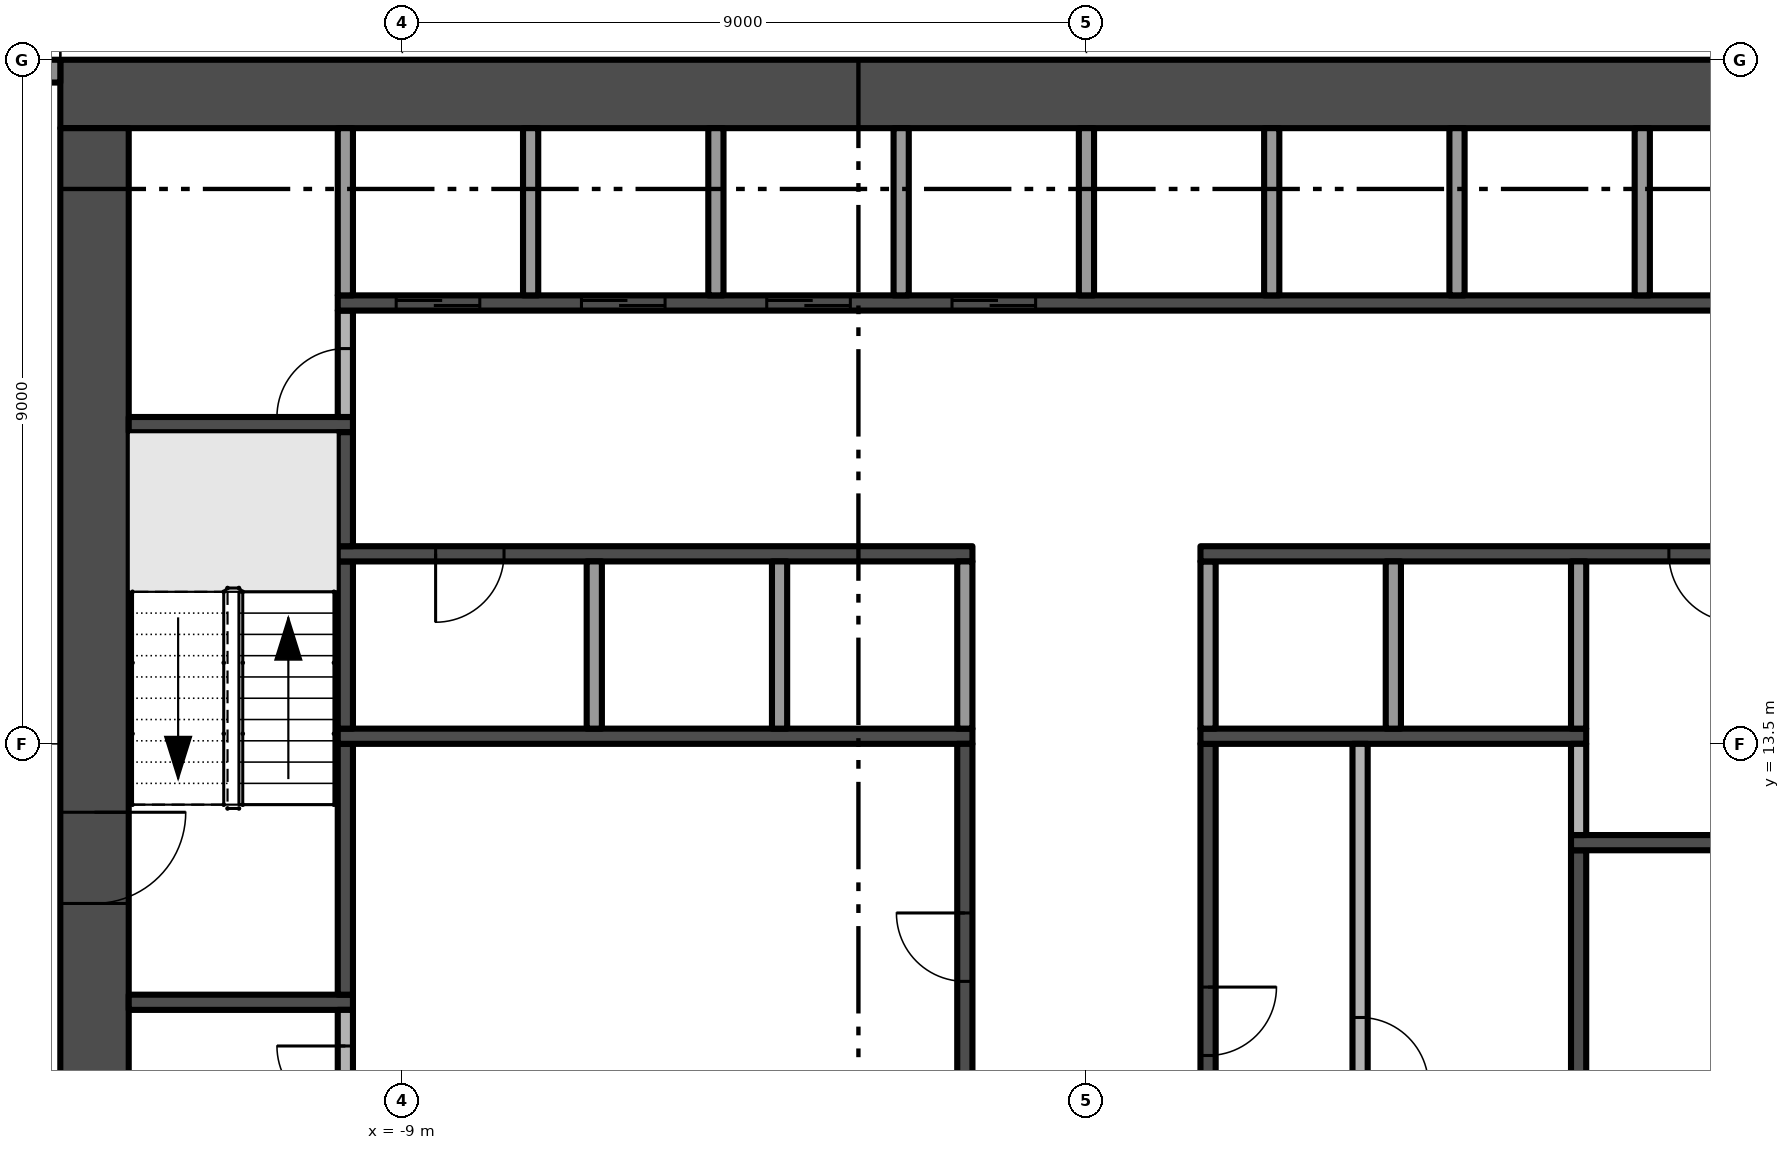
"""IFC4 building model, lengths in metres.
Left out: names, types, materials, properties, quantities, classifications, styles, units other than length and angle.
Written with IfcOpenShell. Run it as: python <this file> out.ifc"""

import sys

from ifc_helpers import new_model, si_unit, direction, frame, frame_2d, origin, place, context, subcontext, project, spatial, rectangle, extrude, element, fill, save


model = new_model("IFC4")
c1 = context("Model", 3, precision=1e-05, world=origin(), true_north=direction((0.0, 1.0)))
c2 = subcontext(c1, "Body", "Model", "MODEL_VIEW")
j1 = project(units=[si_unit("LENGTHUNIT", "METRE"), si_unit("PLANEANGLEUNIT", "RADIAN")], contexts=[c1])
p1 = place(None, origin())
s1 = spatial("IfcSite", under=j1, at=p1, CompositionType="ELEMENT")
p2 = place(p1, origin())
s2 = spatial("IfcBuilding", under=s1, at=p2, CompositionType="ELEMENT")
p3 = place(p2, frame((0.0, 0.0, 30.2)))
s3 = spatial("IfcBuildingStorey", under=s2, at=p3, CompositionType="ELEMENT", Elevation=30.2)
p4 = place(p3, frame((13.5, 22.05, -0.3), z_axis=(0.0, 0.0, 1.0), x_axis=(-1.0, 0.0, 0.0)))
e1 = element("IfcWall", 1, at=p4, inside=s3, PredefinedType="SHEAR", context=c2, shape_type="SweptSolid", body=[
    extrude(rectangle(XDim=27.0, YDim=0.9, at=frame_2d((13.5, 0.0))), origin(), (0.0, 0.0, 1.0), 3.8),
])
p5 = place(p3, frame((-13.05, 21.6, -0.3), z_axis=(0.0, 0.0, 1.0), x_axis=(0.0, -1.0, 0.0)))
e2 = element("IfcWall", 2, at=p5, inside=s3, PredefinedType="SHEAR", context=c2, shape_type="SweptSolid", body=[
    extrude(rectangle(XDim=16.2, YDim=0.9, at=frame_2d((8.1, 0.0))), origin(), (0.0, 0.0, 1.0), 3.8),
])
p6 = place(p5, frame((9.0, 0.0, 0.3)))
e3 = element("IfcOpeningElement", 3, at=p6, cuts=e2, PredefinedType="OPENING", context=c2, shape_type="SweptSolid", body=[
    extrude(rectangle(XDim=1.2, YDim=2.2, at=frame_2d((0.6, 1.1))), frame((0.0, 0.46, 0.0), z_axis=(0.0, -1.0, 0.0), x_axis=(1.0, 0.0, 0.0)), (0.0, 0.0, 1.0), 0.92),
])
p7 = place(p3, frame((-17.275, 22.35, 0.0), z_axis=(0.0, 0.0, 1.0), x_axis=(1.0, 0.0, 0.0)))
e4 = element("IfcWall", 4, at=p7, inside=s3, PredefinedType="SOLIDWALL", context=c2, shape_type="SweptSolid", body=[
    extrude(rectangle(XDim=3.775, YDim=0.3, at=frame_2d((1.887, 0.0))), origin(), (0.0, 0.0, 1.0), 3.5),
])
p8 = place(p7, frame((0.325, 0.0, 0.45)))
e5 = element("IfcOpeningElement", 5, at=p8, cuts=e4, PredefinedType="OPENING", context=c2, shape_type="SweptSolid", body=[
    extrude(rectangle(XDim=2.6, YDim=2.65, at=frame_2d((1.3, 1.325))), frame((0.0, 0.16, 0.0), z_axis=(0.0, -1.0, 0.0), x_axis=(1.0, 0.0, 0.0)), (0.0, 0.0, 1.0), 0.32),
])
for number, where, z_axis, x_axis in (
    (6, (-12.6, 10.1, 0.0), (0.0, 0.0, 1.0), (1.0, 0.0, 0.0)),
    (7, (-12.6, 17.7, 0.0), (0.0, 0.0, 1.0), (1.0, 0.0, 0.0)),
):
    element("IfcWall", number, at=place(p3, frame(where, z_axis=z_axis, x_axis=x_axis)), inside=s3, PredefinedType="SHEAR", context=c2, shape_type="SweptSolid", body=[
        extrude(rectangle(XDim=2.95, YDim=0.2, at=frame_2d((1.475, 0.0))), origin(), (0.0, 0.0, 1.0), 3.5),
    ])
p9 = place(p3, frame((-9.75, 8.15, 0.0), z_axis=(0.0, 0.0, 1.0), x_axis=(0.0, 1.0, 0.0)))
e8 = element("IfcWall", 8, at=p9, inside=s3, PredefinedType="PARTITIONING", context=c2, shape_type="SweptSolid", body=[
    extrude(rectangle(XDim=1.85, YDim=0.2, at=frame_2d((0.925, 0.0))), origin(), (0.0, 0.0, 1.0), 3.5),
])
p10 = place(p9, frame((0.475, 0.0, 0.0)))
e9 = element("IfcOpeningElement", 9, at=p10, cuts=e8, PredefinedType="OPENING", context=c2, shape_type="SweptSolid", body=[
    extrude(rectangle(XDim=0.9, YDim=2.1, at=frame_2d((0.45, 1.05))), frame((0.0, 0.11, 0.0), z_axis=(0.0, -1.0, 0.0), x_axis=(1.0, 0.0, 0.0)), (0.0, 0.0, 1.0), 0.22),
])
p11 = place(p3, frame((-9.75, 10.2, 0.0), z_axis=(0.0, 0.0, 1.0), x_axis=(0.0, 1.0, 0.0)))
e10 = element("IfcWall", 10, at=p11, inside=s3, PredefinedType="SHEAR", context=c2, shape_type="SweptSolid", body=[
    extrude(rectangle(XDim=3.3, YDim=0.2, at=frame_2d((1.65, 0.0))), origin(), (0.0, 0.0, 1.0), 3.5),
])
p12 = place(p3, frame((-9.85, 13.6, 0.0), z_axis=(0.0, 0.0, 1.0), x_axis=(1.0, 0.0, 0.0)))
e11 = element("IfcWall", 11, at=p12, inside=s3, PredefinedType="SHEAR", context=c2, shape_type="SweptSolid", body=[
    extrude(rectangle(XDim=8.35, YDim=0.2, at=frame_2d((4.175, 0.0))), origin(), (0.0, 0.0, 1.0), 3.5),
])
p13 = place(p3, frame((-9.75, 13.7, 0.0), z_axis=(0.0, 0.0, 1.0), x_axis=(0.0, 1.0, 0.0)))
e12 = element("IfcWall", 12, at=p13, inside=s3, PredefinedType="SHEAR", context=c2, shape_type="SweptSolid", body=[
    extrude(rectangle(XDim=2.2, YDim=0.2, at=frame_2d((1.1, 0.0))), origin(), (0.0, 0.0, 1.0), 3.5),
])
p14 = place(p3, frame((-1.5, 16.0, 0.0), z_axis=(0.0, 0.0, 1.0), x_axis=(-1.0, 0.0, 0.0)))
e13 = element("IfcWall", 13, at=p14, inside=s3, PredefinedType="SHEAR", context=c2, shape_type="SweptSolid", body=[
    extrude(rectangle(XDim=8.35, YDim=0.2, at=frame_2d((4.175, 0.0))), origin(), (0.0, 0.0, 1.0), 3.5),
])
p15 = place(p14, frame((6.162, 0.0, 0.0)))
e14 = element("IfcOpeningElement", 14, at=p15, cuts=e13, PredefinedType="OPENING", context=c2, shape_type="SweptSolid", body=[
    extrude(rectangle(XDim=0.9, YDim=2.1, at=frame_2d((0.45, 1.05))), frame((0.0, 0.11, 0.0), z_axis=(0.0, -1.0, 0.0), x_axis=(1.0, 0.0, 0.0)), (0.0, 0.0, 1.0), 0.22),
])
p16 = place(p3, frame((-9.75, 16.1, 0.0), z_axis=(0.0, 0.0, 1.0), x_axis=(0.0, 1.0, 0.0)))
e15 = element("IfcWall", 15, at=p16, inside=s3, PredefinedType="SHEAR", context=c2, shape_type="SweptSolid", body=[
    extrude(rectangle(XDim=1.5, YDim=0.2, at=frame_2d((0.75, 0.0))), origin(), (0.0, 0.0, 1.0), 3.5),
])
p17 = place(p3, frame((-9.75, 17.8, 0.0), z_axis=(0.0, 0.0, 1.0), x_axis=(0.0, 1.0, 0.0)))
e16 = element("IfcWall", 16, at=p17, inside=s3, PredefinedType="PARTITIONING", context=c2, shape_type="SweptSolid", body=[
    extrude(rectangle(XDim=1.4, YDim=0.2, at=frame_2d((0.7, 0.0))), origin(), (0.0, 0.0, 1.0), 3.5),
])
p18 = place(p17, origin())
e17 = element("IfcOpeningElement", 17, at=p18, cuts=e16, PredefinedType="OPENING", context=c2, shape_type="SweptSolid", body=[
    extrude(rectangle(XDim=0.9, YDim=2.1, at=frame_2d((0.45, 1.05))), frame((0.0, 0.11, 0.0), z_axis=(0.0, -1.0, 0.0), x_axis=(1.0, 0.0, 0.0)), (0.0, 0.0, 1.0), 0.22),
])
p19 = place(p3, frame((-9.85, 19.3, 0.0), z_axis=(0.0, 0.0, 1.0), x_axis=(1.0, 0.0, 0.0)))
e18 = element("IfcWall", 18, at=p19, inside=s3, PredefinedType="SHEAR", context=c2, shape_type="SweptSolid", body=[
    extrude(rectangle(XDim=19.7, YDim=0.2, at=frame_2d((9.85, 0.0))), origin(), (0.0, 0.0, 1.0), 3.5),
])
p20 = place(p19, frame((0.769, 0.0, 0.0)))
e19 = element("IfcOpeningElement", 19, at=p20, cuts=e18, PredefinedType="OPENING", context=c2, shape_type="SweptSolid", body=[
    extrude(rectangle(XDim=1.1, YDim=2.1, at=frame_2d((0.55, 1.05))), frame((0.0, 0.11, 0.0), z_axis=(0.0, -1.0, 0.0), x_axis=(1.0, 0.0, 0.0)), (0.0, 0.0, 1.0), 0.22),
])
p21 = place(p19, frame((3.206, 0.0, 0.0)))
e20 = element("IfcOpeningElement", 20, at=p21, cuts=e18, PredefinedType="OPENING", context=c2, shape_type="SweptSolid", body=[
    extrude(rectangle(XDim=1.1, YDim=2.1, at=frame_2d((0.55, 1.05))), frame((0.0, 0.11, 0.0), z_axis=(0.0, -1.0, 0.0), x_axis=(1.0, 0.0, 0.0)), (0.0, 0.0, 1.0), 0.22),
])
p22 = place(p19, frame((5.644, 0.0, 0.0)))
e21 = element("IfcOpeningElement", 21, at=p22, cuts=e18, PredefinedType="OPENING", context=c2, shape_type="SweptSolid", body=[
    extrude(rectangle(XDim=1.1, YDim=2.1, at=frame_2d((0.55, 1.05))), frame((0.0, 0.11, 0.0), z_axis=(0.0, -1.0, 0.0), x_axis=(1.0, 0.0, 0.0)), (0.0, 0.0, 1.0), 0.22),
])
p23 = place(p19, frame((8.081, 0.0, 0.0)))
e22 = element("IfcOpeningElement", 22, at=p23, cuts=e18, PredefinedType="OPENING", context=c2, shape_type="SweptSolid", body=[
    extrude(rectangle(XDim=1.1, YDim=2.1, at=frame_2d((0.55, 1.05))), frame((0.0, 0.11, 0.0), z_axis=(0.0, -1.0, 0.0), x_axis=(1.0, 0.0, 0.0)), (0.0, 0.0, 1.0), 0.22),
])
for number, where, z_axis, x_axis in (
    (23, (-9.75, 19.4, 0.0), (0.0, 0.0, 1.0), (0.0, 1.0, 0.0)),
    (24, (-7.312, 19.4, 0.0), (0.0, 0.0, 1.0), (0.0, 1.0, 0.0)),
    (25, (-6.475, 13.7, 0.0), (0.0, 0.0, 1.0), (0.0, 1.0, 0.0)),
    (26, (-4.875, 19.4, 0.0), (0.0, 0.0, 1.0), (0.0, 1.0, 0.0)),
    (27, (-4.037, 13.7, 0.0), (0.0, 0.0, 1.0), (0.0, 1.0, 0.0)),
    (28, (-2.438, 19.4, 0.0), (0.0, 0.0, 1.0), (0.0, 1.0, 0.0)),
):
    element("IfcWall", number, at=place(p3, frame(where, z_axis=z_axis, x_axis=x_axis)), inside=s3, PredefinedType="PARTITIONING", context=c2, shape_type="SweptSolid", body=[
        extrude(rectangle(XDim=2.2, YDim=0.2, at=frame_2d((1.1, 0.0))), origin(), (0.0, 0.0, 1.0), 3.5),
    ])
p24 = place(p3, frame((-1.6, 8.15, 0.0), z_axis=(0.0, 0.0, 1.0), x_axis=(0.0, 1.0, 0.0)))
e29 = element("IfcWall", 29, at=p24, inside=s3, PredefinedType="SHEAR", context=c2, shape_type="SweptSolid", body=[
    extrude(rectangle(XDim=5.35, YDim=0.2, at=frame_2d((2.675, 0.0))), origin(), (0.0, 0.0, 1.0), 3.5),
])
p25 = place(p24, frame((2.225, 0.0, 0.0)))
e30 = element("IfcOpeningElement", 30, at=p25, cuts=e29, PredefinedType="OPENING", context=c2, shape_type="SweptSolid", body=[
    extrude(rectangle(XDim=0.9, YDim=2.1, at=frame_2d((0.45, 1.05))), frame((0.0, 0.11, 0.0), z_axis=(0.0, -1.0, 0.0), x_axis=(1.0, 0.0, 0.0)), (0.0, 0.0, 1.0), 0.22),
])
for number, where, z_axis, x_axis in (
    (31, (-1.6, 13.7, 0.0), (0.0, 0.0, 1.0), (0.0, 1.0, 0.0)),
    (32, (0.0, 19.4, 0.0), (0.0, 0.0, 1.0), (0.0, 1.0, 0.0)),
):
    element("IfcWall", number, at=place(p3, frame(where, z_axis=z_axis, x_axis=x_axis)), inside=s3, PredefinedType="PARTITIONING", context=c2, shape_type="SweptSolid", body=[
        extrude(rectangle(XDim=2.2, YDim=0.2, at=frame_2d((1.1, 0.0))), origin(), (0.0, 0.0, 1.0), 3.5),
    ])
p26 = place(p3, frame((1.6, 13.5, 0.0), z_axis=(0.0, 0.0, 1.0), x_axis=(0.0, -1.0, 0.0)))
e33 = element("IfcWall", 33, at=p26, inside=s3, PredefinedType="SHEAR", context=c2, shape_type="SweptSolid", body=[
    extrude(rectangle(XDim=8.1, YDim=0.2, at=frame_2d((4.05, 0.0))), origin(), (0.0, 0.0, 1.0), 3.5),
])
p27 = place(p26, frame((3.2, 0.0, 0.0)))
e34 = element("IfcOpeningElement", 34, at=p27, cuts=e33, PredefinedType="OPENING", context=c2, shape_type="SweptSolid", body=[
    extrude(rectangle(XDim=0.9, YDim=2.1, at=frame_2d((0.45, 1.05))), frame((0.0, 0.11, 0.0), z_axis=(0.0, -1.0, 0.0), x_axis=(1.0, 0.0, 0.0)), (0.0, 0.0, 1.0), 0.22),
])
p28 = place(p3, frame((1.5, 13.6, 0.0), z_axis=(0.0, 0.0, 1.0), x_axis=(1.0, 0.0, 0.0)))
e35 = element("IfcWall", 35, at=p28, inside=s3, PredefinedType="SHEAR", context=c2, shape_type="SweptSolid", body=[
    extrude(rectangle(XDim=5.075, YDim=0.2, at=frame_2d((2.538, 0.0))), origin(), (0.0, 0.0, 1.0), 3.5),
])
p29 = place(p3, frame((1.6, 13.7, 0.0), z_axis=(0.0, 0.0, 1.0), x_axis=(0.0, 1.0, 0.0)))
e36 = element("IfcWall", 36, at=p29, inside=s3, PredefinedType="PARTITIONING", context=c2, shape_type="SweptSolid", body=[
    extrude(rectangle(XDim=2.2, YDim=0.2, at=frame_2d((1.1, 0.0))), origin(), (0.0, 0.0, 1.0), 3.5),
])
p30 = place(p3, frame((9.85, 16.0, 0.0), z_axis=(0.0, 0.0, 1.0), x_axis=(-1.0, 0.0, 0.0)))
e37 = element("IfcWall", 37, at=p30, inside=s3, PredefinedType="SHEAR", context=c2, shape_type="SweptSolid", body=[
    extrude(rectangle(XDim=8.35, YDim=0.2, at=frame_2d((4.175, 0.0))), origin(), (0.0, 0.0, 1.0), 3.5),
])
p31 = place(p30, frame((1.288, 0.0, 0.0)))
e38 = element("IfcOpeningElement", 38, at=p31, cuts=e37, PredefinedType="OPENING", context=c2, shape_type="SweptSolid", body=[
    extrude(rectangle(XDim=0.9, YDim=2.1, at=frame_2d((0.45, 1.05))), frame((0.0, 0.11, 0.0), z_axis=(0.0, -1.0, 0.0), x_axis=(1.0, 0.0, 0.0)), (0.0, 0.0, 1.0), 0.22),
])
p32 = place(p3, frame((2.438, 19.4, 0.0), z_axis=(0.0, 0.0, 1.0), x_axis=(0.0, 1.0, 0.0)))
e39 = element("IfcWall", 39, at=p32, inside=s3, PredefinedType="PARTITIONING", context=c2, shape_type="SweptSolid", body=[
    extrude(rectangle(XDim=2.2, YDim=0.2, at=frame_2d((1.1, 0.0))), origin(), (0.0, 0.0, 1.0), 3.5),
])
p33 = place(p3, frame((3.6, 13.5, 0.0), z_axis=(0.0, 0.0, 1.0), x_axis=(0.0, -1.0, 0.0)))
e40 = element("IfcWall", 40, at=p33, inside=s3, PredefinedType="PARTITIONING", context=c2, shape_type="SweptSolid", body=[
    extrude(rectangle(XDim=8.1, YDim=0.2, at=frame_2d((4.05, 0.0))), origin(), (0.0, 0.0, 1.0), 3.5),
])
p34 = place(p33, frame((3.6, 0.0, 0.0)))
e41 = element("IfcOpeningElement", 41, at=p34, cuts=e40, PredefinedType="OPENING", context=c2, shape_type="SweptSolid", body=[
    extrude(rectangle(XDim=0.9, YDim=2.1, at=frame_2d((0.45, 1.05))), frame((0.0, 0.11, 0.0), z_axis=(0.0, -1.0, 0.0), x_axis=(1.0, 0.0, 0.0)), (0.0, 0.0, 1.0), 0.22),
])
for number, where, z_axis, x_axis in (
    (42, (4.037, 13.7, 0.0), (0.0, 0.0, 1.0), (0.0, 1.0, 0.0)),
    (43, (4.875, 19.4, 0.0), (0.0, 0.0, 1.0), (0.0, 1.0, 0.0)),
):
    element("IfcWall", number, at=place(p3, frame(where, z_axis=z_axis, x_axis=x_axis)), inside=s3, PredefinedType="PARTITIONING", context=c2, shape_type="SweptSolid", body=[
        extrude(rectangle(XDim=2.2, YDim=0.2, at=frame_2d((1.1, 0.0))), origin(), (0.0, 0.0, 1.0), 3.5),
    ])
p35 = place(p3, frame((6.475, 5.4, 0.0), z_axis=(0.0, 0.0, 1.0), x_axis=(0.0, 1.0, 0.0)))
e44 = element("IfcWall", 44, at=p35, inside=s3, PredefinedType="SHEAR", context=c2, shape_type="SweptSolid", body=[
    extrude(rectangle(XDim=6.7, YDim=0.2, at=frame_2d((3.35, 0.0))), origin(), (0.0, 0.0, 1.0), 3.5),
])
p36 = place(p3, frame((6.375, 12.2, 0.0), z_axis=(0.0, 0.0, 1.0), x_axis=(1.0, 0.0, 0.0)))
e45 = element("IfcWall", 45, at=p36, inside=s3, PredefinedType="SHEAR", context=c2, shape_type="SweptSolid", body=[
    extrude(rectangle(XDim=3.475, YDim=0.2, at=frame_2d((1.738, 0.0))), origin(), (0.0, 0.0, 1.0), 3.5),
])
p37 = place(p3, frame((6.475, 12.3, 0.0), z_axis=(0.0, 0.0, 1.0), x_axis=(0.0, 1.0, 0.0)))
e46 = element("IfcWall", 46, at=p37, inside=s3, PredefinedType="PARTITIONING", context=c2, shape_type="SweptSolid", body=[
    extrude(rectangle(XDim=1.2, YDim=0.2, at=frame_2d((0.6, 0.0))), origin(), (0.0, 0.0, 1.0), 3.5),
])
for number, where, z_axis, x_axis in (
    (47, (6.475, 13.7, 0.0), (0.0, 0.0, 1.0), (0.0, 1.0, 0.0)),
    (48, (7.312, 19.4, 0.0), (0.0, 0.0, 1.0), (0.0, 1.0, 0.0)),
):
    element("IfcWall", number, at=place(p3, frame(where, z_axis=z_axis, x_axis=x_axis)), inside=s3, PredefinedType="PARTITIONING", context=c2, shape_type="SweptSolid", body=[
        extrude(rectangle(XDim=2.2, YDim=0.2, at=frame_2d((1.1, 0.0))), origin(), (0.0, 0.0, 1.0), 3.5),
    ])
p38 = place(p6, frame((1.2, 0.0, 0.0), z_axis=(0.0, 0.0, 1.0), x_axis=(-1.0, 0.0, 0.0)))
e49 = element("IfcDoor", 49, at=p38, inside=s3, OperationType="SINGLE_SWING_RIGHT", PredefinedType="DOOR", context=c2, shape_type="SweptSolid", body=[
    extrude(rectangle(XDim=1.2, YDim=2.2, at=frame_2d((0.6, 1.1))), frame((0.0, 0.025, 0.0), z_axis=(0.0, -1.0, 0.0), x_axis=(1.0, 0.0, 0.0)), (0.0, 0.0, 1.0), 0.05),
])
fill(e3, e49)
p39 = place(p20, origin())
e50 = element("IfcDoor", 50, at=p39, inside=s3, OperationType="SLIDING_TO_LEFT", PredefinedType="DOOR", context=c2, shape_type="SweptSolid", body=[
    extrude(rectangle(XDim=1.1, YDim=2.1, at=frame_2d((0.55, 1.05))), frame((0.0, 0.025, 0.0), z_axis=(0.0, -1.0, 0.0), x_axis=(1.0, 0.0, 0.0)), (0.0, 0.0, 1.0), 0.05),
])
fill(e19, e50)
p40 = place(p21, origin())
e51 = element("IfcDoor", 51, at=p40, inside=s3, OperationType="SLIDING_TO_LEFT", PredefinedType="DOOR", context=c2, shape_type="SweptSolid", body=[
    extrude(rectangle(XDim=1.1, YDim=2.1, at=frame_2d((0.55, 1.05))), frame((0.0, 0.025, 0.0), z_axis=(0.0, -1.0, 0.0), x_axis=(1.0, 0.0, 0.0)), (0.0, 0.0, 1.0), 0.05),
])
fill(e20, e51)
p41 = place(p22, origin())
e52 = element("IfcDoor", 52, at=p41, inside=s3, OperationType="SLIDING_TO_LEFT", PredefinedType="DOOR", context=c2, shape_type="SweptSolid", body=[
    extrude(rectangle(XDim=1.1, YDim=2.1, at=frame_2d((0.55, 1.05))), frame((0.0, 0.025, 0.0), z_axis=(0.0, -1.0, 0.0), x_axis=(1.0, 0.0, 0.0)), (0.0, 0.0, 1.0), 0.05),
])
fill(e21, e52)
p42 = place(p23, origin())
e53 = element("IfcDoor", 53, at=p42, inside=s3, OperationType="SLIDING_TO_LEFT", PredefinedType="DOOR", context=c2, shape_type="SweptSolid", body=[
    extrude(rectangle(XDim=1.1, YDim=2.1, at=frame_2d((0.55, 1.05))), frame((0.0, 0.025, 0.0), z_axis=(0.0, -1.0, 0.0), x_axis=(1.0, 0.0, 0.0)), (0.0, 0.0, 1.0), 0.05),
])
fill(e22, e53)
p43 = place(p25, origin())
e54 = element("IfcDoor", 54, at=p43, inside=s3, OperationType="SINGLE_SWING_RIGHT", PredefinedType="DOOR", context=c2, shape_type="SweptSolid", body=[
    extrude(rectangle(XDim=0.9, YDim=2.1, at=frame_2d((0.45, 1.05))), frame((0.0, 0.025, 0.0), z_axis=(0.0, -1.0, 0.0), x_axis=(1.0, 0.0, 0.0)), (0.0, 0.0, 1.0), 0.05),
])
fill(e30, e54)
p44 = place(p15, origin())
e55 = element("IfcDoor", 55, at=p44, inside=s3, OperationType="SINGLE_SWING_RIGHT", PredefinedType="DOOR", context=c2, shape_type="SweptSolid", body=[
    extrude(rectangle(XDim=0.9, YDim=2.1, at=frame_2d((0.45, 1.05))), frame((0.0, 0.025, 0.0), z_axis=(0.0, -1.0, 0.0), x_axis=(1.0, 0.0, 0.0)), (0.0, 0.0, 1.0), 0.05),
])
fill(e14, e55)
p45 = place(p27, origin())
e56 = element("IfcDoor", 56, at=p45, inside=s3, OperationType="SINGLE_SWING_LEFT", PredefinedType="DOOR", context=c2, shape_type="SweptSolid", body=[
    extrude(rectangle(XDim=0.9, YDim=2.1, at=frame_2d((0.45, 1.05))), frame((0.0, 0.025, 0.0), z_axis=(0.0, -1.0, 0.0), x_axis=(1.0, 0.0, 0.0)), (0.0, 0.0, 1.0), 0.05),
])
fill(e34, e56)
p46 = place(p31, origin())
e57 = element("IfcDoor", 57, at=p46, inside=s3, OperationType="SINGLE_SWING_LEFT", PredefinedType="DOOR", context=c2, shape_type="SweptSolid", body=[
    extrude(rectangle(XDim=0.9, YDim=2.1, at=frame_2d((0.45, 1.05))), frame((0.0, 0.025, 0.0), z_axis=(0.0, -1.0, 0.0), x_axis=(1.0, 0.0, 0.0)), (0.0, 0.0, 1.0), 0.05),
])
fill(e38, e57)
p47 = place(p18, origin())
e58 = element("IfcDoor", 58, at=p47, inside=s3, OperationType="SINGLE_SWING_LEFT", PredefinedType="DOOR", context=c2, shape_type="SweptSolid", body=[
    extrude(rectangle(XDim=0.9, YDim=2.1, at=frame_2d((0.45, 1.05))), frame((0.0, 0.025, 0.0), z_axis=(0.0, -1.0, 0.0), x_axis=(1.0, 0.0, 0.0)), (0.0, 0.0, 1.0), 0.05),
])
fill(e17, e58)
p48 = place(p10, origin())
e59 = element("IfcDoor", 59, at=p48, inside=s3, OperationType="SINGLE_SWING_RIGHT", PredefinedType="DOOR", context=c2, shape_type="SweptSolid", body=[
    extrude(rectangle(XDim=0.9, YDim=2.1, at=frame_2d((0.45, 1.05))), frame((0.0, 0.025, 0.0), z_axis=(0.0, -1.0, 0.0), x_axis=(1.0, 0.0, 0.0)), (0.0, 0.0, 1.0), 0.05),
])
fill(e9, e59)
p49 = place(p34, origin())
e60 = element("IfcDoor", 60, at=p49, inside=s3, OperationType="SINGLE_SWING_RIGHT", PredefinedType="DOOR", context=c2, shape_type="SweptSolid", body=[
    extrude(rectangle(XDim=0.9, YDim=2.1, at=frame_2d((0.45, 1.05))), frame((0.0, 0.025, 0.0), z_axis=(0.0, -1.0, 0.0), x_axis=(1.0, 0.0, 0.0)), (0.0, 0.0, 1.0), 0.05),
])
fill(e41, e60)
save(model, sys.argv[1])
